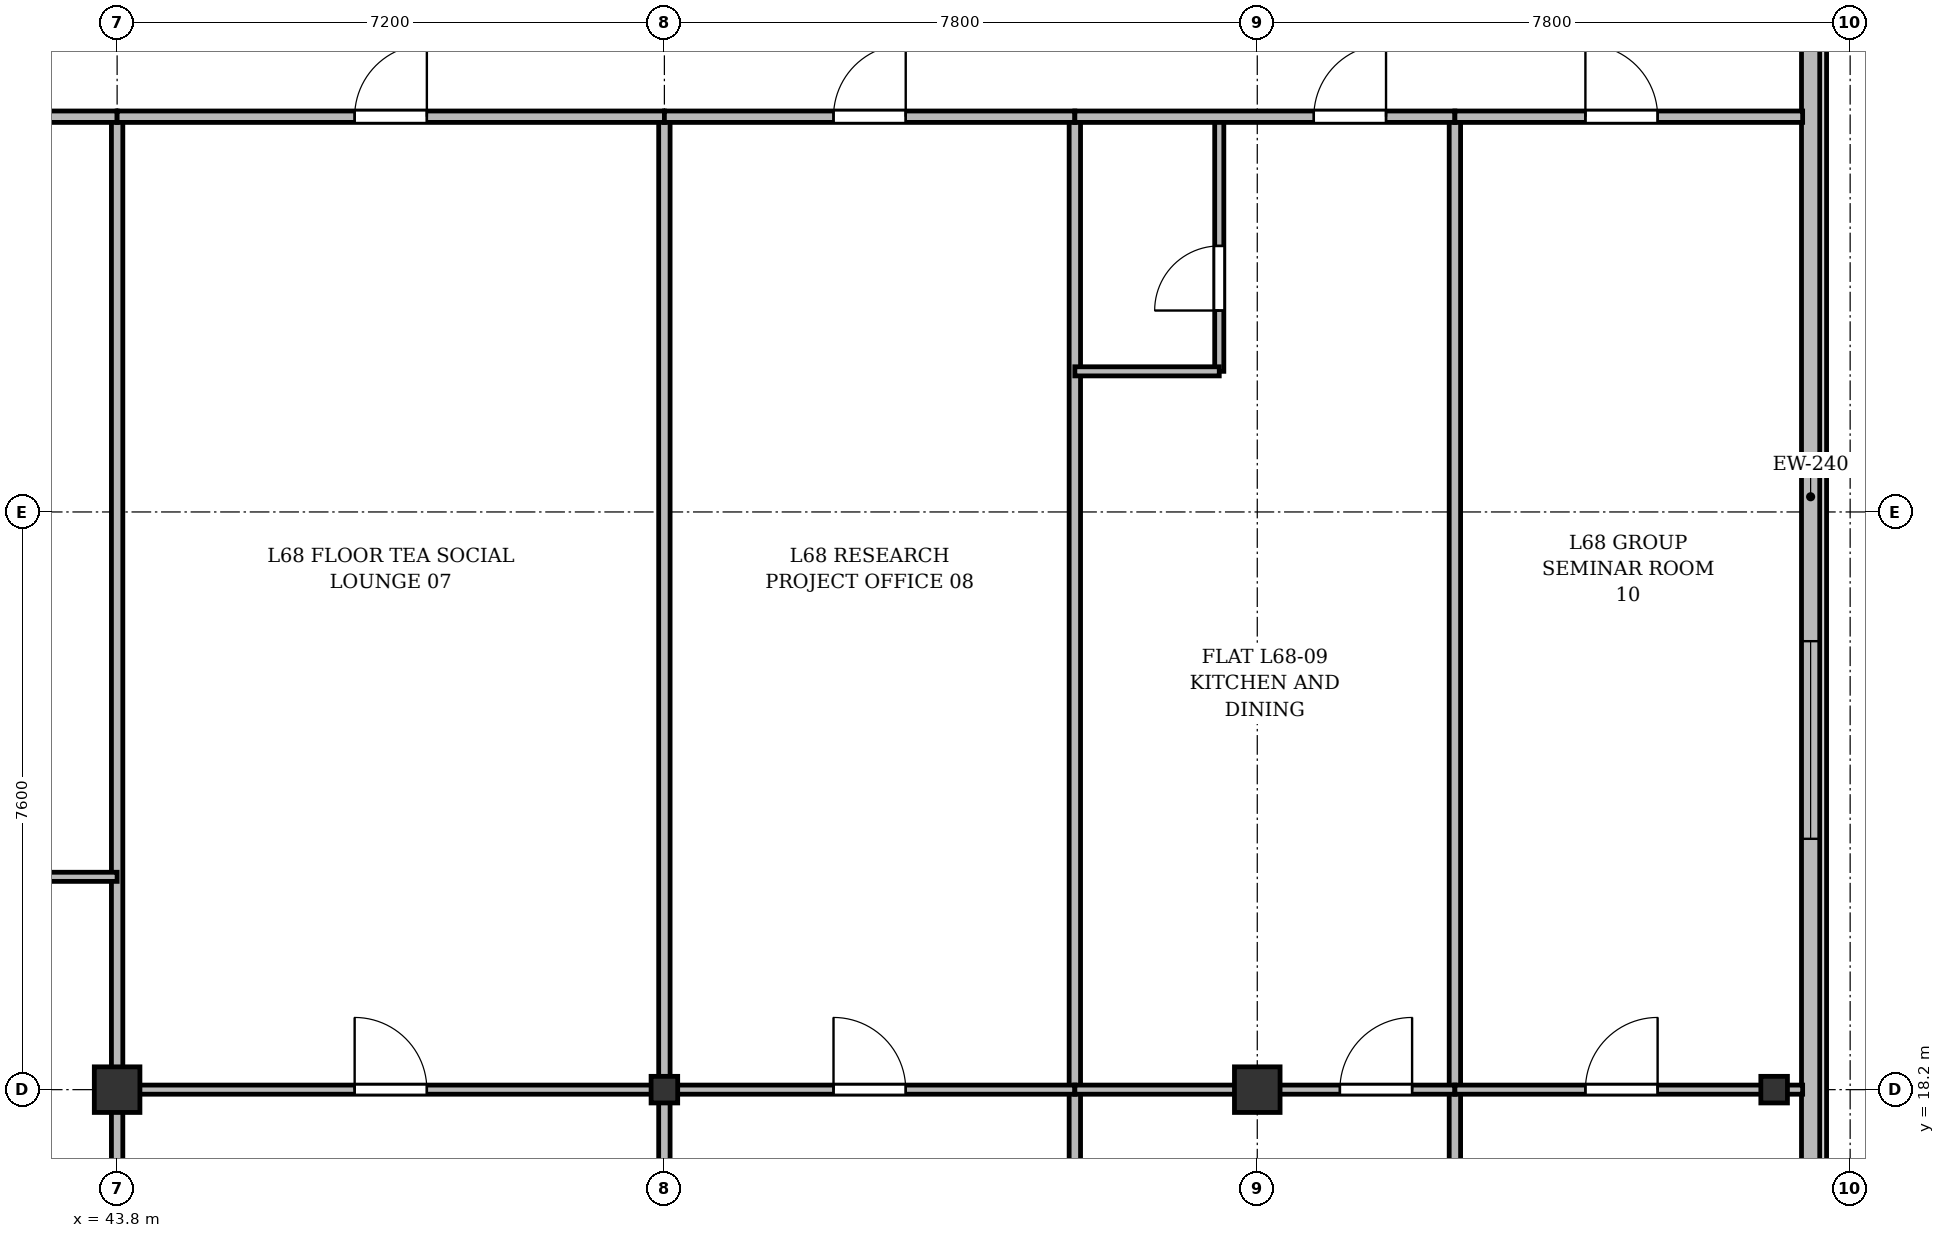
"""IFC4 building model, lengths in metres.
Left out: names, types, materials, properties, quantities, classifications, styles, units other than length and angle.
Written with IfcOpenShell. Run it as: python <this file> out.ifc"""

import sys

from ifc_helpers import new_model, si_unit, direction, frame, frame_2d, origin, origin_2d, place, context, subcontext, project, spatial, rectangle, i_section, extrude, source, transform, mapped, element, fill, save


model = new_model("IFC4")
c1 = context("Model", 3, precision=1e-05, world=origin(), true_north=direction((0.0, 1.0)))
c2 = subcontext(c1, "Body", "Model", "MODEL_VIEW")
j1 = project(units=[si_unit("LENGTHUNIT", "METRE"), si_unit("PLANEANGLEUNIT", "RADIAN")], contexts=[c1])
p1 = place(None, origin())
s1 = spatial("IfcSite", under=j1, at=p1, CompositionType="ELEMENT")
p2 = place(p1, origin())
s2 = spatial("IfcBuilding", under=s1, at=p2, CompositionType="ELEMENT")
p3 = place(p2, frame((0.0, 0.0, 263.1)))
s3 = spatial("IfcBuildingStorey", under=s2, at=p3, CompositionType="ELEMENT", Elevation=263.1)
m1 = source(origin(), c2, "Body", "SweptSolid", [
    extrude(rectangle(XDim=0.6, YDim=0.6, at=origin_2d()), origin(), (0.0, 0.0, 1.0), 3.6),
])
p4 = place(p3, frame((43.8, 18.2, 0.0), z_axis=(0.0, 0.0, 1.0), x_axis=(1.0, 0.0, 0.0)))
e1 = element("IfcColumn", 1, at=p4, inside=s3, PredefinedType="COLUMN", context=c2, shape_type="MappedRepresentation", body=[
    mapped(m1, transform((0.0, 0.0, 0.0), x_axis=(1.0, 0.0, 0.0), y_axis=(0.0, 1.0, 0.0), z_axis=(0.0, 0.0, 1.0), scale=1.0)),
])
m2 = source(origin(), c2, "Body", "SweptSolid", [
    extrude(i_section(OverallWidth=0.35, OverallDepth=0.35, WebThickness=0.018, FlangeThickness=0.028, at=origin_2d()), origin(), (0.0, 0.0, 1.0), 3.6),
])
p5 = place(p3, frame((51.0, 18.2, 0.0), z_axis=(0.0, 0.0, 1.0), x_axis=(1.0, 0.0, 0.0)))
e2 = element("IfcColumn", 2, at=p5, inside=s3, PredefinedType="COLUMN", context=c2, shape_type="MappedRepresentation", body=[
    mapped(m2, transform((0.0, 0.0, 0.0), x_axis=(1.0, 0.0, 0.0), y_axis=(0.0, 1.0, 0.0), z_axis=(0.0, 0.0, 1.0), scale=1.0)),
])
p6 = place(p3, frame((58.8, 18.2, 0.0), z_axis=(0.0, 0.0, 1.0), x_axis=(1.0, 0.0, 0.0)))
e3 = element("IfcColumn", 3, at=p6, inside=s3, PredefinedType="COLUMN", context=c2, shape_type="MappedRepresentation", body=[
    mapped(m1, transform((0.0, 0.0, 0.0), x_axis=(1.0, 0.0, 0.0), y_axis=(0.0, 1.0, 0.0), z_axis=(0.0, 0.0, 1.0), scale=1.0)),
])
p7 = place(p3, frame((65.6, 18.2, 0.0), z_axis=(0.0, 0.0, 1.0), x_axis=(1.0, 0.0, 0.0)))
e4 = element("IfcColumn", 4, at=p7, inside=s3, PredefinedType="COLUMN", context=c2, shape_type="MappedRepresentation", body=[
    mapped(m2, transform((0.0, 0.0, 0.0), x_axis=(1.0, 0.0, 0.0), y_axis=(0.0, 1.0, 0.0), z_axis=(0.0, 0.0, 1.0), scale=1.0)),
])
p8 = place(p3, frame((66.08, 45.5, 0.0), z_axis=(0.0, 0.0, 1.0), x_axis=(0.0, -1.0, 0.0)))
e5 = element("IfcWall", 5, at=p8, inside=s3, PredefinedType="SOLIDWALL", context=c2, shape_type="SweptSolid", body=[
    extrude(rectangle(XDim=39.0, YDim=0.24, at=frame_2d((19.5, 0.0))), origin(), (0.0, 0.0, 1.0), 3.37),
])
p9 = place(p8, frame((36.35, 0.0, 0.92)))
e6 = element("IfcOpeningElement", 6, at=p9, cuts=e5, PredefinedType="OPENING", context=c2, shape_type="SweptSolid", body=[
    extrude(rectangle(XDim=1.2, YDim=1.65, at=frame_2d((0.6, 0.825))), frame((0.0, 0.13, 0.0), z_axis=(0.0, -1.0, 0.0), x_axis=(1.0, 0.0, 0.0)), (0.0, 0.0, 1.0), 0.26),
])
p10 = place(p8, frame((32.8, 0.0, 0.92)))
e7 = element("IfcOpeningElement", 7, at=p10, cuts=e5, PredefinedType="OPENING", context=c2, shape_type="SweptSolid", body=[
    extrude(rectangle(XDim=2.6, YDim=1.9, at=frame_2d((1.3, 0.95))), frame((0.0, 0.13, 0.0), z_axis=(0.0, -1.0, 0.0), x_axis=(1.0, 0.0, 0.0)), (0.0, 0.0, 1.0), 0.26),
])
p11 = place(p8, frame((28.6, 0.0, 0.92)))
e8 = element("IfcOpeningElement", 8, at=p11, cuts=e5, PredefinedType="OPENING", context=c2, shape_type="SweptSolid", body=[
    extrude(rectangle(XDim=2.6, YDim=1.9, at=frame_2d((1.3, 0.95))), frame((0.0, 0.13, 0.0), z_axis=(0.0, -1.0, 0.0), x_axis=(1.0, 0.0, 0.0)), (0.0, 0.0, 1.0), 0.26),
])
p12 = place(p8, frame((21.4, 0.0, 0.92)))
e9 = element("IfcOpeningElement", 9, at=p12, cuts=e5, PredefinedType="OPENING", context=c2, shape_type="SweptSolid", body=[
    extrude(rectangle(XDim=2.6, YDim=1.9, at=frame_2d((1.3, 0.95))), frame((0.0, 0.13, 0.0), z_axis=(0.0, -1.0, 0.0), x_axis=(1.0, 0.0, 0.0)), (0.0, 0.0, 1.0), 0.26),
])
p13 = place(p8, frame((7.4, 0.0, 0.92)))
e10 = element("IfcOpeningElement", 10, at=p13, cuts=e5, PredefinedType="OPENING", context=c2, shape_type="SweptSolid", body=[
    extrude(rectangle(XDim=2.6, YDim=1.9, at=frame_2d((1.3, 0.95))), frame((0.0, 0.13, 0.0), z_axis=(0.0, -1.0, 0.0), x_axis=(1.0, 0.0, 0.0)), (0.0, 0.0, 1.0), 0.26),
])
p14 = place(p8, frame((4.5, 0.0, 0.92)))
e11 = element("IfcOpeningElement", 11, at=p14, cuts=e5, PredefinedType="OPENING", context=c2, shape_type="SweptSolid", body=[
    extrude(rectangle(XDim=1.2, YDim=1.65, at=frame_2d((0.6, 0.825))), frame((0.0, 0.13, 0.0), z_axis=(0.0, -1.0, 0.0), x_axis=(1.0, 0.0, 0.0)), (0.0, 0.0, 1.0), 0.26),
])
p15 = place(p8, frame((1.15, 0.0, 0.92)))
e12 = element("IfcOpeningElement", 12, at=p15, cuts=e5, PredefinedType="OPENING", context=c2, shape_type="SweptSolid", body=[
    extrude(rectangle(XDim=1.2, YDim=1.65, at=frame_2d((0.6, 0.825))), frame((0.0, 0.13, 0.0), z_axis=(0.0, -1.0, 0.0), x_axis=(1.0, 0.0, 0.0)), (0.0, 0.0, 1.0), 0.26),
])
for number, where, z_axis, x_axis in (
    (13, (43.8, 3.725, 0.0), (0.0, 0.0, 1.0), (0.0, 1.0, 0.0)),
    (14, (51.0, 3.725, 0.0), (0.0, 0.0, 1.0), (0.0, 1.0, 0.0)),
):
    element("IfcWall", number, at=place(p3, frame(where, z_axis=z_axis, x_axis=x_axis)), inside=s3, PredefinedType="PARTITIONING", context=c2, shape_type="SweptSolid", body=[
        extrude(rectangle(XDim=27.275, YDim=0.15, at=frame_2d((13.637, 0.0))), origin(), (0.0, 0.0, 1.0), 2.87),
    ])
for number, where, z_axis, x_axis in (
    (15, (56.4, 3.725, 0.0), (0.0, 0.0, 1.0), (0.0, 1.0, 0.0)),
    (16, (61.4, 3.725, 0.0), (0.0, 0.0, 1.0), (0.0, 1.0, 0.0)),
):
    element("IfcWall", number, at=place(p3, frame(where, z_axis=z_axis, x_axis=x_axis)), inside=s3, PredefinedType="PARTITIONING", context=c2, shape_type="SweptSolid", body=[
        extrude(rectangle(XDim=27.275, YDim=0.15, at=frame_2d((13.637, 0.0))), origin(), (0.0, 0.0, 1.0), 2.92),
    ])
p16 = place(p3, frame((36.4, 21.0, 0.0), z_axis=(0.0, 0.0, 1.0), x_axis=(1.0, 0.0, 0.0)))
e17 = element("IfcWall", 17, at=p16, inside=s3, PredefinedType="PARTITIONING", context=c2, shape_type="SweptSolid", body=[
    extrude(rectangle(XDim=7.4, YDim=0.12, at=frame_2d((3.7, 0.0))), origin(), (0.0, 0.0, 1.0), 2.87),
])
p17 = place(p16, frame((3.133, 0.0, 0.0)))
e18 = element("IfcOpeningElement", 18, at=p17, cuts=e17, PredefinedType="OPENING", context=c2, shape_type="SweptSolid", body=[
    extrude(rectangle(XDim=0.95, YDim=2.15, at=frame_2d((0.475, 1.075))), frame((0.0, 0.07, 0.0), z_axis=(0.0, -1.0, 0.0), x_axis=(1.0, 0.0, 0.0)), (0.0, 0.0, 1.0), 0.14),
])
p18 = place(p3, frame((36.4, 31.0, 0.0), z_axis=(0.0, 0.0, 1.0), x_axis=(1.0, 0.0, 0.0)))
e19 = element("IfcWall", 19, at=p18, inside=s3, PredefinedType="PARTITIONING", context=c2, shape_type="SweptSolid", body=[
    extrude(rectangle(XDim=7.4, YDim=0.15, at=frame_2d((3.7, 0.0))), origin(), (0.0, 0.0, 1.0), 2.87),
])
p19 = place(p18, frame((4.967, 0.0, 0.0)))
e20 = element("IfcOpeningElement", 20, at=p19, cuts=e19, PredefinedType="OPENING", context=c2, shape_type="SweptSolid", body=[
    extrude(rectangle(XDim=0.95, YDim=2.15, at=frame_2d((0.475, 1.075))), frame((0.0, 0.085, 0.0), z_axis=(0.0, -1.0, 0.0), x_axis=(1.0, 0.0, 0.0)), (0.0, 0.0, 1.0), 0.17),
])
p20 = place(p3, frame((43.8, 31.0, 0.0), z_axis=(0.0, 0.0, 1.0), x_axis=(1.0, 0.0, 0.0)))
e21 = element("IfcWall", 21, at=p20, inside=s3, PredefinedType="PARTITIONING", context=c2, shape_type="SweptSolid", body=[
    extrude(rectangle(XDim=7.2, YDim=0.15, at=frame_2d((3.6, 0.0))), origin(), (0.0, 0.0, 1.0), 2.87),
])
p21 = place(p20, frame((3.125, 0.0, 0.0)))
e22 = element("IfcOpeningElement", 22, at=p21, cuts=e21, PredefinedType="OPENING", context=c2, shape_type="SweptSolid", body=[
    extrude(rectangle(XDim=0.95, YDim=2.15, at=frame_2d((0.475, 1.075))), frame((0.0, 0.085, 0.0), z_axis=(0.0, -1.0, 0.0), x_axis=(1.0, 0.0, 0.0)), (0.0, 0.0, 1.0), 0.17),
])
p22 = place(p3, frame((43.8, 18.2, 0.0), z_axis=(0.0, 0.0, 1.0), x_axis=(1.0, 0.0, 0.0)))
e23 = element("IfcWall", 23, at=p22, inside=s3, PredefinedType="PARTITIONING", context=c2, shape_type="SweptSolid", body=[
    extrude(rectangle(XDim=7.2, YDim=0.12, at=frame_2d((3.6, 0.0))), origin(), (0.0, 0.0, 1.0), 2.92),
])
p23 = place(p22, frame((3.125, 0.0, 0.0)))
e24 = element("IfcOpeningElement", 24, at=p23, cuts=e23, PredefinedType="OPENING", context=c2, shape_type="SweptSolid", body=[
    extrude(rectangle(XDim=0.95, YDim=2.15, at=frame_2d((0.475, 1.075))), frame((0.0, 0.07, 0.0), z_axis=(0.0, -1.0, 0.0), x_axis=(1.0, 0.0, 0.0)), (0.0, 0.0, 1.0), 0.14),
])
p24 = place(p3, frame((51.0, 31.0, 0.0), z_axis=(0.0, 0.0, 1.0), x_axis=(1.0, 0.0, 0.0)))
e25 = element("IfcWall", 25, at=p24, inside=s3, PredefinedType="PARTITIONING", context=c2, shape_type="SweptSolid", body=[
    extrude(rectangle(XDim=5.4, YDim=0.15, at=frame_2d((2.7, 0.0))), origin(), (0.0, 0.0, 1.0), 2.87),
])
p25 = place(p24, frame((2.225, 0.0, 0.0)))
e26 = element("IfcOpeningElement", 26, at=p25, cuts=e25, PredefinedType="OPENING", context=c2, shape_type="SweptSolid", body=[
    extrude(rectangle(XDim=0.95, YDim=2.15, at=frame_2d((0.475, 1.075))), frame((0.0, 0.085, 0.0), z_axis=(0.0, -1.0, 0.0), x_axis=(1.0, 0.0, 0.0)), (0.0, 0.0, 1.0), 0.17),
])
p26 = place(p3, frame((51.0, 18.2, 0.0), z_axis=(0.0, 0.0, 1.0), x_axis=(1.0, 0.0, 0.0)))
e27 = element("IfcWall", 27, at=p26, inside=s3, PredefinedType="PARTITIONING", context=c2, shape_type="SweptSolid", body=[
    extrude(rectangle(XDim=5.4, YDim=0.12, at=frame_2d((2.7, 0.0))), origin(), (0.0, 0.0, 1.0), 2.92),
])
p27 = place(p26, frame((2.225, 0.0, 0.0)))
e28 = element("IfcOpeningElement", 28, at=p27, cuts=e27, PredefinedType="OPENING", context=c2, shape_type="SweptSolid", body=[
    extrude(rectangle(XDim=0.95, YDim=2.15, at=frame_2d((0.475, 1.075))), frame((0.0, 0.07, 0.0), z_axis=(0.0, -1.0, 0.0), x_axis=(1.0, 0.0, 0.0)), (0.0, 0.0, 1.0), 0.14),
])
p28 = place(p3, frame((56.4, 18.2, 0.0), z_axis=(0.0, 0.0, 1.0), x_axis=(1.0, 0.0, 0.0)))
e29 = element("IfcWall", 29, at=p28, inside=s3, PredefinedType="PARTITIONING", context=c2, shape_type="SweptSolid", body=[
    extrude(rectangle(XDim=5.0, YDim=0.12, at=frame_2d((2.5, 0.0))), origin(), (0.0, 0.0, 1.0), 2.92),
])
p29 = place(p28, frame((3.487, 0.0, 0.0)))
e30 = element("IfcOpeningElement", 30, at=p29, cuts=e29, PredefinedType="OPENING", context=c2, shape_type="SweptSolid", body=[
    extrude(rectangle(XDim=0.95, YDim=2.15, at=frame_2d((0.475, 1.075))), frame((0.0, 0.07, 0.0), z_axis=(0.0, -1.0, 0.0), x_axis=(1.0, 0.0, 0.0)), (0.0, 0.0, 1.0), 0.14),
])
p30 = place(p3, frame((58.3, 27.65, 0.0), z_axis=(0.0, 0.0, 1.0), x_axis=(0.0, 1.0, 0.0)))
e31 = element("IfcWall", 31, at=p30, inside=s3, PredefinedType="PARTITIONING", context=c2, shape_type="SweptSolid", body=[
    extrude(rectangle(XDim=3.35, YDim=0.12, at=frame_2d((1.675, 0.0))), origin(), (0.0, 0.0, 1.0), 3.37),
])
p31 = place(p30, frame((0.8, 0.0, 0.0)))
e32 = element("IfcOpeningElement", 32, at=p31, cuts=e31, PredefinedType="OPENING", context=c2, shape_type="SweptSolid", body=[
    extrude(rectangle(XDim=0.85, YDim=2.1, at=frame_2d((0.425, 1.05))), frame((0.0, 0.07, 0.0), z_axis=(0.0, -1.0, 0.0), x_axis=(1.0, 0.0, 0.0)), (0.0, 0.0, 1.0), 0.14),
])
p32 = place(p3, frame((56.4, 27.65, 0.0), z_axis=(0.0, 0.0, 1.0), x_axis=(1.0, 0.0, 0.0)))
e33 = element("IfcWall", 33, at=p32, inside=s3, PredefinedType="PARTITIONING", context=c2, shape_type="SweptSolid", body=[
    extrude(rectangle(XDim=1.9, YDim=0.12, at=frame_2d((0.95, 0.0))), origin(), (0.0, 0.0, 1.0), 3.37),
])
p33 = place(p3, frame((56.4, 31.0, 0.0), z_axis=(0.0, 0.0, 1.0), x_axis=(1.0, 0.0, 0.0)))
e34 = element("IfcWall", 34, at=p33, inside=s3, PredefinedType="PARTITIONING", context=c2, shape_type="SweptSolid", body=[
    extrude(rectangle(XDim=5.0, YDim=0.15, at=frame_2d((2.5, 0.0))), origin(), (0.0, 0.0, 1.0), 2.87),
])
p34 = place(p33, frame((3.144, 0.0, 0.0)))
e35 = element("IfcOpeningElement", 35, at=p34, cuts=e34, PredefinedType="OPENING", context=c2, shape_type="SweptSolid", body=[
    extrude(rectangle(XDim=0.95, YDim=2.15, at=frame_2d((0.475, 1.075))), frame((0.0, 0.085, 0.0), z_axis=(0.0, -1.0, 0.0), x_axis=(1.0, 0.0, 0.0)), (0.0, 0.0, 1.0), 0.17),
])
p35 = place(p3, frame((61.4, 31.0, 0.0), z_axis=(0.0, 0.0, 1.0), x_axis=(1.0, 0.0, 0.0)))
e36 = element("IfcWall", 36, at=p35, inside=s3, PredefinedType="PARTITIONING", context=c2, shape_type="SweptSolid", body=[
    extrude(rectangle(XDim=4.575, YDim=0.15, at=frame_2d((2.288, 0.0))), origin(), (0.0, 0.0, 1.0), 2.87),
])
p36 = place(p35, frame((1.717, 0.0, 0.0)))
e37 = element("IfcOpeningElement", 37, at=p36, cuts=e36, PredefinedType="OPENING", context=c2, shape_type="SweptSolid", body=[
    extrude(rectangle(XDim=0.95, YDim=2.15, at=frame_2d((0.475, 1.075))), frame((0.0, 0.085, 0.0), z_axis=(0.0, -1.0, 0.0), x_axis=(1.0, 0.0, 0.0)), (0.0, 0.0, 1.0), 0.17),
])
p37 = place(p3, frame((61.4, 18.2, 0.0), z_axis=(0.0, 0.0, 1.0), x_axis=(1.0, 0.0, 0.0)))
e38 = element("IfcWall", 38, at=p37, inside=s3, PredefinedType="PARTITIONING", context=c2, shape_type="SweptSolid", body=[
    extrude(rectangle(XDim=4.575, YDim=0.12, at=frame_2d((2.288, 0.0))), origin(), (0.0, 0.0, 1.0), 2.92),
])
p38 = place(p37, frame((1.717, 0.0, 0.0)))
e39 = element("IfcOpeningElement", 39, at=p38, cuts=e38, PredefinedType="OPENING", context=c2, shape_type="SweptSolid", body=[
    extrude(rectangle(XDim=0.95, YDim=2.15, at=frame_2d((0.475, 1.075))), frame((0.0, 0.07, 0.0), z_axis=(0.0, -1.0, 0.0), x_axis=(1.0, 0.0, 0.0)), (0.0, 0.0, 1.0), 0.14),
])
m3 = source(origin(), c2, "Body", "SweptSolid", [
    extrude(rectangle(XDim=2.6, YDim=1.9, at=frame_2d((1.3, 0.95))), frame((0.0, 0.03, 0.0), z_axis=(0.0, -1.0, 0.0), x_axis=(1.0, 0.0, 0.0)), (0.0, 0.0, 1.0), 0.06),
])
p39 = place(p12, origin())
e40 = element("IfcWindow", 40, at=p39, inside=s3, PartitioningType="SINGLE_PANEL", PredefinedType="WINDOW", context=c2, shape_type="MappedRepresentation", body=[
    mapped(m3, transform((0.0, 0.0, 0.0), x_axis=(1.0, 0.0, 0.0), y_axis=(0.0, 1.0, 0.0), z_axis=(0.0, 0.0, 1.0), scale=1.0)),
])
fill(e9, e40)
m4 = source(origin(), c2, "Body", "SweptSolid", [
    extrude(rectangle(XDim=0.95, YDim=2.15, at=frame_2d((0.475, 1.075))), frame((0.0, 0.025, 0.0), z_axis=(0.0, -1.0, 0.0), x_axis=(1.0, 0.0, 0.0)), (0.0, 0.0, 1.0), 0.05),
])
p40 = place(p21, origin())
e41 = element("IfcDoor", 41, at=p40, inside=s3, OperationType="SINGLE_SWING_RIGHT", PredefinedType="DOOR", context=c2, shape_type="MappedRepresentation", body=[
    mapped(m4, transform((0.0, 0.0, 0.0), x_axis=(1.0, 0.0, 0.0), y_axis=(0.0, 1.0, 0.0), z_axis=(0.0, 0.0, 1.0), scale=1.0)),
])
fill(e22, e41)
p41 = place(p23, origin())
e42 = element("IfcDoor", 42, at=p41, inside=s3, OperationType="SINGLE_SWING_LEFT", PredefinedType="DOOR", context=c2, shape_type="MappedRepresentation", body=[
    mapped(m4, transform((0.0, 0.0, 0.0), x_axis=(1.0, 0.0, 0.0), y_axis=(0.0, 1.0, 0.0), z_axis=(0.0, 0.0, 1.0), scale=1.0)),
])
fill(e24, e42)
p42 = place(p25, origin())
e43 = element("IfcDoor", 43, at=p42, inside=s3, OperationType="SINGLE_SWING_RIGHT", PredefinedType="DOOR", context=c2, shape_type="MappedRepresentation", body=[
    mapped(m4, transform((0.0, 0.0, 0.0), x_axis=(1.0, 0.0, 0.0), y_axis=(0.0, 1.0, 0.0), z_axis=(0.0, 0.0, 1.0), scale=1.0)),
])
fill(e26, e43)
p43 = place(p27, origin())
e44 = element("IfcDoor", 44, at=p43, inside=s3, OperationType="SINGLE_SWING_LEFT", PredefinedType="DOOR", context=c2, shape_type="MappedRepresentation", body=[
    mapped(m4, transform((0.0, 0.0, 0.0), x_axis=(1.0, 0.0, 0.0), y_axis=(0.0, 1.0, 0.0), z_axis=(0.0, 0.0, 1.0), scale=1.0)),
])
fill(e28, e44)
p44 = place(p29, origin())
e45 = element("IfcDoor", 45, at=p44, inside=s3, OperationType="SINGLE_SWING_RIGHT", PredefinedType="DOOR", context=c2, shape_type="MappedRepresentation", body=[
    mapped(m4, transform((0.0, 0.0, 0.0), x_axis=(1.0, 0.0, 0.0), y_axis=(0.0, 1.0, 0.0), z_axis=(0.0, 0.0, 1.0), scale=1.0)),
])
fill(e30, e45)
m5 = source(origin(), c2, "Body", "SweptSolid", [
    extrude(rectangle(XDim=0.85, YDim=2.1, at=frame_2d((0.425, 1.05))), frame((0.0, 0.025, 0.0), z_axis=(0.0, -1.0, 0.0), x_axis=(1.0, 0.0, 0.0)), (0.0, 0.0, 1.0), 0.05),
])
p45 = place(p31, origin())
e46 = element("IfcDoor", 46, at=p45, inside=s3, OperationType="SINGLE_SWING_LEFT", PredefinedType="DOOR", context=c2, shape_type="MappedRepresentation", body=[
    mapped(m5, transform((0.0, 0.0, 0.0), x_axis=(1.0, 0.0, 0.0), y_axis=(0.0, 1.0, 0.0), z_axis=(0.0, 0.0, 1.0), scale=1.0)),
])
fill(e32, e46)
p46 = place(p34, origin())
e47 = element("IfcDoor", 47, at=p46, inside=s3, OperationType="SINGLE_SWING_RIGHT", PredefinedType="DOOR", context=c2, shape_type="MappedRepresentation", body=[
    mapped(m4, transform((0.0, 0.0, 0.0), x_axis=(1.0, 0.0, 0.0), y_axis=(0.0, 1.0, 0.0), z_axis=(0.0, 0.0, 1.0), scale=1.0)),
])
fill(e35, e47)
p47 = place(p36, origin())
e48 = element("IfcDoor", 48, at=p47, inside=s3, OperationType="SINGLE_SWING_LEFT", PredefinedType="DOOR", context=c2, shape_type="MappedRepresentation", body=[
    mapped(m4, transform((0.0, 0.0, 0.0), x_axis=(1.0, 0.0, 0.0), y_axis=(0.0, 1.0, 0.0), z_axis=(0.0, 0.0, 1.0), scale=1.0)),
])
fill(e37, e48)
p48 = place(p38, origin())
e49 = element("IfcDoor", 49, at=p48, inside=s3, OperationType="SINGLE_SWING_RIGHT", PredefinedType="DOOR", context=c2, shape_type="MappedRepresentation", body=[
    mapped(m4, transform((0.0, 0.0, 0.0), x_axis=(1.0, 0.0, 0.0), y_axis=(0.0, 1.0, 0.0), z_axis=(0.0, 0.0, 1.0), scale=1.0)),
])
fill(e39, e49)
save(model, sys.argv[1])
